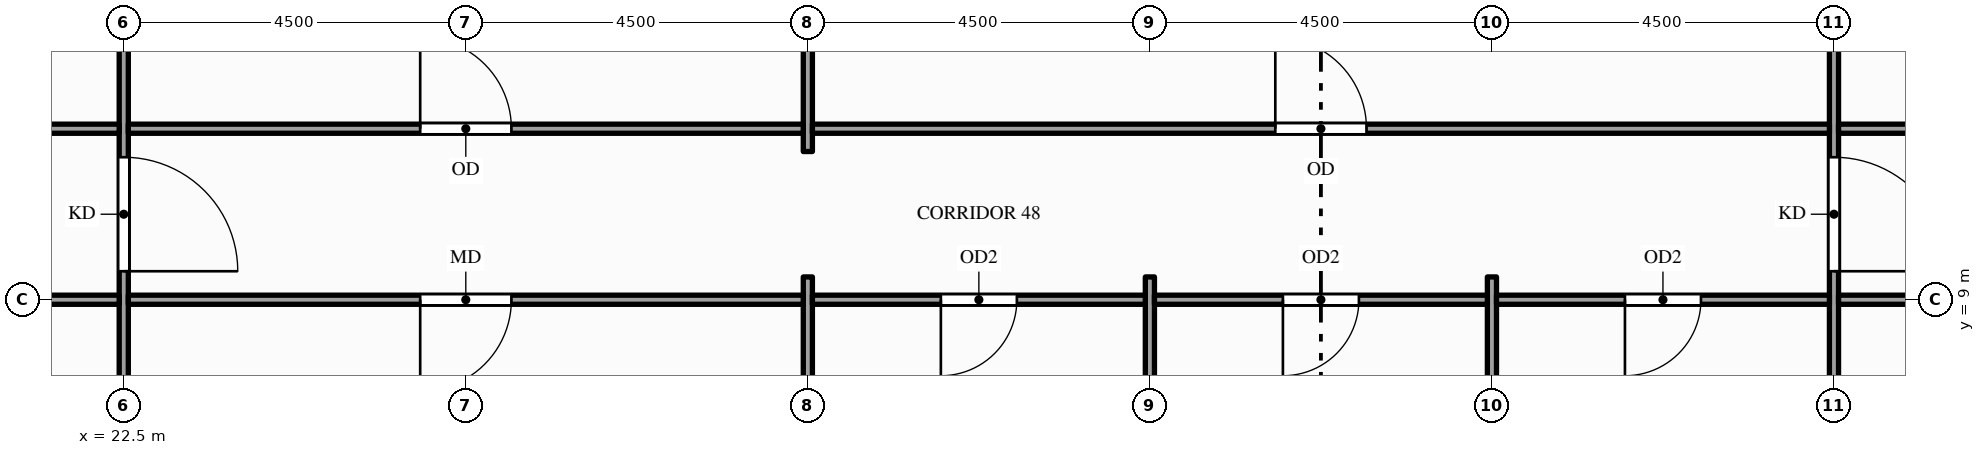
"""IFC4 building model, lengths in metres.
Left out: names, types, materials, properties, quantities, classifications, styles, units other than length and angle.
Written with IfcOpenShell. Run it as: python <this file> out.ifc"""

import sys

from ifc_helpers import new_model, si_unit, direction, frame, frame_2d, origin, place, context, subcontext, project, spatial, rectangle, extrude, element, fill, save


model = new_model("IFC4")
c1 = context("Model", 3, precision=1e-05, world=origin(), true_north=direction((0.0, 1.0)))
c2 = subcontext(c1, "Body", "Model", "MODEL_VIEW")
j1 = project(units=[si_unit("LENGTHUNIT", "METRE"), si_unit("PLANEANGLEUNIT", "RADIAN")], contexts=[c1])
p1 = place(None, origin())
s1 = spatial("IfcSite", under=j1, at=p1, CompositionType="ELEMENT")
p2 = place(p1, origin())
s2 = spatial("IfcBuilding", under=s1, at=p2, CompositionType="ELEMENT")
p3 = place(p2, frame((0.0, 0.0, 8.0)))
s3 = spatial("IfcBuildingStorey", under=s2, at=p3, CompositionType="ELEMENT", Elevation=8.0)
p4 = place(p3, frame((22.5, 0.15, 0.0), z_axis=(0.0, 0.0, 1.0), x_axis=(0.0, 1.0, 0.0)))
e1 = element("IfcWall", 1, at=p4, inside=s3, PredefinedType="PARTITIONING", context=c2, shape_type="SweptSolid", body=[
    extrude(rectangle(XDim=35.95, YDim=0.12, at=frame_2d((17.975, 0.0))), origin(), (0.0, 0.0, 1.0), 4.759),
])
p5 = place(p4, frame((9.225, 0.0, 0.0)))
e2 = element("IfcOpeningElement", 2, at=p5, cuts=e1, PredefinedType="OPENING", context=c2, shape_type="SweptSolid", body=[
    extrude(rectangle(XDim=1.5, YDim=2.1, at=frame_2d((0.75, 1.05))), frame((0.0, 0.07, 0.0), z_axis=(0.0, -1.0, 0.0), x_axis=(1.0, 0.0, 0.0)), (0.0, 0.0, 1.0), 0.14),
])
p6 = place(p4, frame((32.7, 0.0, 0.0)))
e3 = element("IfcOpeningElement", 3, at=p6, cuts=e1, PredefinedType="OPENING", context=c2, shape_type="SweptSolid", body=[
    extrude(rectangle(XDim=1.8, YDim=2.1, at=frame_2d((0.9, 1.05))), frame((0.0, 0.07, 0.0), z_axis=(0.0, -1.0, 0.0), x_axis=(1.0, 0.0, 0.0)), (0.0, 0.0, 1.0), 0.14),
])
p7 = place(p3, frame((31.5, 0.15, 0.0), z_axis=(0.0, 0.0, 1.0), x_axis=(0.0, 1.0, 0.0)))
e4 = element("IfcWall", 4, at=p7, inside=s3, PredefinedType="PARTITIONING", context=c2, shape_type="SweptSolid", body=[
    extrude(rectangle(XDim=9.15, YDim=0.12, at=frame_2d((4.575, 0.0))), origin(), (0.0, 0.0, 1.0), 4.759),
])
p8 = place(p3, frame((31.5, 10.95, 0.0), z_axis=(0.0, 0.0, 1.0), x_axis=(0.0, 1.0, 0.0)))
e5 = element("IfcWall", 5, at=p8, inside=s3, PredefinedType="PARTITIONING", context=c2, shape_type="SweptSolid", body=[
    extrude(rectangle(XDim=11.85, YDim=0.12, at=frame_2d((5.925, 0.0))), origin(), (0.0, 0.0, 1.0), 4.759),
])
for number, where, z_axis, x_axis in (
    (6, (36.0, 0.15, 0.0), (0.0, 0.0, 1.0), (0.0, 1.0, 0.0)),
    (7, (40.5, 0.15, 0.0), (0.0, 0.0, 1.0), (0.0, 1.0, 0.0)),
):
    element("IfcWall", number, at=place(p3, frame(where, z_axis=z_axis, x_axis=x_axis)), inside=s3, PredefinedType="PARTITIONING", context=c2, shape_type="SweptSolid", body=[
        extrude(rectangle(XDim=9.15, YDim=0.12, at=frame_2d((4.575, 0.0))), origin(), (0.0, 0.0, 1.0), 4.759),
    ])
p9 = place(p3, frame((45.0, 0.15, 0.0), z_axis=(0.0, 0.0, 1.0), x_axis=(0.0, 1.0, 0.0)))
e8 = element("IfcWall", 8, at=p9, inside=s3, PredefinedType="PARTITIONING", context=c2, shape_type="SweptSolid", body=[
    extrude(rectangle(XDim=22.65, YDim=0.12, at=frame_2d((11.325, 0.0))), origin(), (0.0, 0.0, 1.0), 4.759),
])
p10 = place(p9, frame((9.225, 0.0, 0.0)))
e9 = element("IfcOpeningElement", 9, at=p10, cuts=e8, PredefinedType="OPENING", context=c2, shape_type="SweptSolid", body=[
    extrude(rectangle(XDim=1.5, YDim=2.1, at=frame_2d((0.75, 1.05))), frame((0.0, 0.07, 0.0), z_axis=(0.0, -1.0, 0.0), x_axis=(1.0, 0.0, 0.0)), (0.0, 0.0, 1.0), 0.14),
])
p11 = place(p3, frame((18.06, 9.0, 0.0), z_axis=(0.0, 0.0, 1.0), x_axis=(1.0, 0.0, 0.0)))
e10 = element("IfcWall", 10, at=p11, inside=s3, PredefinedType="PARTITIONING", context=c2, shape_type="SweptSolid", body=[
    extrude(rectangle(XDim=4.38, YDim=0.12, at=frame_2d((2.19, 0.0))), origin(), (0.0, 0.0, 1.0), 4.759),
])
p12 = place(p11, frame((1.69, 0.0, 0.0)))
e11 = element("IfcOpeningElement", 11, at=p12, cuts=e10, PredefinedType="OPENING", context=c2, shape_type="SweptSolid", body=[
    extrude(rectangle(XDim=1.0, YDim=2.1, at=frame_2d((0.5, 1.05))), frame((0.0, 0.07, 0.0), z_axis=(0.0, -1.0, 0.0), x_axis=(1.0, 0.0, 0.0)), (0.0, 0.0, 1.0), 0.14),
])
p13 = place(p3, frame((22.56, 9.0, 0.0), z_axis=(0.0, 0.0, 1.0), x_axis=(1.0, 0.0, 0.0)))
e12 = element("IfcWall", 12, at=p13, inside=s3, PredefinedType="PARTITIONING", context=c2, shape_type="SweptSolid", body=[
    extrude(rectangle(XDim=8.88, YDim=0.12, at=frame_2d((4.44, 0.0))), origin(), (0.0, 0.0, 1.0), 4.66),
])
p14 = place(p13, frame((3.84, 0.0, 0.0)))
e13 = element("IfcOpeningElement", 13, at=p14, cuts=e12, PredefinedType="OPENING", context=c2, shape_type="SweptSolid", body=[
    extrude(rectangle(XDim=1.2, YDim=2.1, at=frame_2d((0.6, 1.05))), frame((0.0, 0.07, 0.0), z_axis=(0.0, -1.0, 0.0), x_axis=(1.0, 0.0, 0.0)), (0.0, 0.0, 1.0), 0.14),
])
p15 = place(p3, frame((31.56, 9.0, 0.0), z_axis=(0.0, 0.0, 1.0), x_axis=(1.0, 0.0, 0.0)))
e14 = element("IfcWall", 14, at=p15, inside=s3, PredefinedType="PARTITIONING", context=c2, shape_type="SweptSolid", body=[
    extrude(rectangle(XDim=4.38, YDim=0.12, at=frame_2d((2.19, 0.0))), origin(), (0.0, 0.0, 1.0), 4.66),
])
p16 = place(p15, frame((1.69, 0.0, 0.0)))
e15 = element("IfcOpeningElement", 15, at=p16, cuts=e14, PredefinedType="OPENING", context=c2, shape_type="SweptSolid", body=[
    extrude(rectangle(XDim=1.0, YDim=2.1, at=frame_2d((0.5, 1.05))), frame((0.0, 0.07, 0.0), z_axis=(0.0, -1.0, 0.0), x_axis=(1.0, 0.0, 0.0)), (0.0, 0.0, 1.0), 0.14),
])
p17 = place(p3, frame((36.06, 9.0, 0.0), z_axis=(0.0, 0.0, 1.0), x_axis=(1.0, 0.0, 0.0)))
e16 = element("IfcWall", 16, at=p17, inside=s3, PredefinedType="PARTITIONING", context=c2, shape_type="SweptSolid", body=[
    extrude(rectangle(XDim=4.38, YDim=0.12, at=frame_2d((2.19, 0.0))), origin(), (0.0, 0.0, 1.0), 4.66),
])
p18 = place(p17, frame((1.69, 0.0, 0.0)))
e17 = element("IfcOpeningElement", 17, at=p18, cuts=e16, PredefinedType="OPENING", context=c2, shape_type="SweptSolid", body=[
    extrude(rectangle(XDim=1.0, YDim=2.1, at=frame_2d((0.5, 1.05))), frame((0.0, 0.07, 0.0), z_axis=(0.0, -1.0, 0.0), x_axis=(1.0, 0.0, 0.0)), (0.0, 0.0, 1.0), 0.14),
])
p19 = place(p3, frame((40.56, 9.0, 0.0), z_axis=(0.0, 0.0, 1.0), x_axis=(1.0, 0.0, 0.0)))
e18 = element("IfcWall", 18, at=p19, inside=s3, PredefinedType="PARTITIONING", context=c2, shape_type="SweptSolid", body=[
    extrude(rectangle(XDim=4.38, YDim=0.12, at=frame_2d((2.19, 0.0))), origin(), (0.0, 0.0, 1.0), 4.66),
])
p20 = place(p19, frame((1.69, 0.0, 0.0)))
e19 = element("IfcOpeningElement", 19, at=p20, cuts=e18, PredefinedType="OPENING", context=c2, shape_type="SweptSolid", body=[
    extrude(rectangle(XDim=1.0, YDim=2.1, at=frame_2d((0.5, 1.05))), frame((0.0, 0.07, 0.0), z_axis=(0.0, -1.0, 0.0), x_axis=(1.0, 0.0, 0.0)), (0.0, 0.0, 1.0), 0.14),
])
p21 = place(p3, frame((45.06, 9.0, 0.0), z_axis=(0.0, 0.0, 1.0), x_axis=(1.0, 0.0, 0.0)))
e20 = element("IfcWall", 20, at=p21, inside=s3, PredefinedType="PARTITIONING", context=c2, shape_type="SweptSolid", body=[
    extrude(rectangle(XDim=4.38, YDim=0.12, at=frame_2d((2.19, 0.0))), origin(), (0.0, 0.0, 1.0), 4.66),
])
p22 = place(p3, frame((11.31, 11.25, 0.0), z_axis=(0.0, 0.0, 1.0), x_axis=(1.0, 0.0, 0.0)))
e21 = element("IfcWall", 21, at=p22, inside=s3, PredefinedType="PARTITIONING", context=c2, shape_type="SweptSolid", body=[
    extrude(rectangle(XDim=11.13, YDim=0.12, at=frame_2d((5.565, 0.0))), origin(), (0.0, 0.0, 1.0), 4.759),
])
p23 = place(p3, frame((22.56, 11.25, 0.0), z_axis=(0.0, 0.0, 1.0), x_axis=(1.0, 0.0, 0.0)))
e22 = element("IfcWall", 22, at=p23, inside=s3, PredefinedType="PARTITIONING", context=c2, shape_type="SweptSolid", body=[
    extrude(rectangle(XDim=8.88, YDim=0.12, at=frame_2d((4.44, 0.0))), origin(), (0.0, 0.0, 1.0), 4.66),
])
p24 = place(p23, frame((3.84, 0.0, 0.0)))
e23 = element("IfcOpeningElement", 23, at=p24, cuts=e22, PredefinedType="OPENING", context=c2, shape_type="SweptSolid", body=[
    extrude(rectangle(XDim=1.2, YDim=2.1, at=frame_2d((0.6, 1.05))), frame((0.0, 0.07, 0.0), z_axis=(0.0, -1.0, 0.0), x_axis=(1.0, 0.0, 0.0)), (0.0, 0.0, 1.0), 0.14),
])
p25 = place(p3, frame((31.56, 11.25, 0.0), z_axis=(0.0, 0.0, 1.0), x_axis=(1.0, 0.0, 0.0)))
e24 = element("IfcWall", 24, at=p25, inside=s3, PredefinedType="PARTITIONING", context=c2, shape_type="SweptSolid", body=[
    extrude(rectangle(XDim=13.38, YDim=0.12, at=frame_2d((6.69, 0.0))), origin(), (0.0, 0.0, 1.0), 4.66),
])
p26 = place(p25, frame((6.09, 0.0, 0.0)))
e25 = element("IfcOpeningElement", 25, at=p26, cuts=e24, PredefinedType="OPENING", context=c2, shape_type="SweptSolid", body=[
    extrude(rectangle(XDim=1.2, YDim=2.1, at=frame_2d((0.6, 1.05))), frame((0.0, 0.07, 0.0), z_axis=(0.0, -1.0, 0.0), x_axis=(1.0, 0.0, 0.0)), (0.0, 0.0, 1.0), 0.14),
])
p27 = place(p3, frame((45.06, 11.25, 0.0), z_axis=(0.0, 0.0, 1.0), x_axis=(1.0, 0.0, 0.0)))
e26 = element("IfcWall", 26, at=p27, inside=s3, PredefinedType="PARTITIONING", context=c2, shape_type="SweptSolid", body=[
    extrude(rectangle(XDim=4.38, YDim=0.12, at=frame_2d((2.19, 0.0))), origin(), (0.0, 0.0, 1.0), 4.66),
])
p28 = place(p10, origin())
e27 = element("IfcDoor", 27, at=p28, inside=s3, OperationType="SINGLE_SWING_LEFT", PredefinedType="DOOR", context=c2, shape_type="SweptSolid", body=[
    extrude(rectangle(XDim=1.5, YDim=2.1, at=frame_2d((0.75, 1.05))), frame((0.0, 0.025, 0.0), z_axis=(0.0, -1.0, 0.0), x_axis=(1.0, 0.0, 0.0)), (0.0, 0.0, 1.0), 0.05),
])
fill(e9, e27)
p29 = place(p14, origin())
e28 = element("IfcDoor", 28, at=p29, inside=s3, OperationType="SINGLE_SWING_LEFT", PredefinedType="DOOR", context=c2, shape_type="SweptSolid", body=[
    extrude(rectangle(XDim=1.2, YDim=2.1, at=frame_2d((0.6, 1.05))), frame((0.0, 0.025, 0.0), z_axis=(0.0, -1.0, 0.0), x_axis=(1.0, 0.0, 0.0)), (0.0, 0.0, 1.0), 0.05),
])
fill(e13, e28)
p30 = place(p16, origin())
e29 = element("IfcDoor", 29, at=p30, inside=s3, OperationType="SINGLE_SWING_LEFT", PredefinedType="DOOR", context=c2, shape_type="SweptSolid", body=[
    extrude(rectangle(XDim=1.0, YDim=2.1, at=frame_2d((0.5, 1.05))), frame((0.0, 0.025, 0.0), z_axis=(0.0, -1.0, 0.0), x_axis=(1.0, 0.0, 0.0)), (0.0, 0.0, 1.0), 0.05),
])
fill(e15, e29)
p31 = place(p18, origin())
e30 = element("IfcDoor", 30, at=p31, inside=s3, OperationType="SINGLE_SWING_LEFT", PredefinedType="DOOR", context=c2, shape_type="SweptSolid", body=[
    extrude(rectangle(XDim=1.0, YDim=2.1, at=frame_2d((0.5, 1.05))), frame((0.0, 0.025, 0.0), z_axis=(0.0, -1.0, 0.0), x_axis=(1.0, 0.0, 0.0)), (0.0, 0.0, 1.0), 0.05),
])
fill(e17, e30)
p32 = place(p20, origin())
e31 = element("IfcDoor", 31, at=p32, inside=s3, OperationType="SINGLE_SWING_LEFT", PredefinedType="DOOR", context=c2, shape_type="SweptSolid", body=[
    extrude(rectangle(XDim=1.0, YDim=2.1, at=frame_2d((0.5, 1.05))), frame((0.0, 0.025, 0.0), z_axis=(0.0, -1.0, 0.0), x_axis=(1.0, 0.0, 0.0)), (0.0, 0.0, 1.0), 0.05),
])
fill(e19, e31)
p33 = place(p24, origin())
e32 = element("IfcDoor", 32, at=p33, inside=s3, OperationType="SINGLE_SWING_LEFT", PredefinedType="DOOR", context=c2, shape_type="SweptSolid", body=[
    extrude(rectangle(XDim=1.2, YDim=2.1, at=frame_2d((0.6, 1.05))), frame((0.0, 0.025, 0.0), z_axis=(0.0, -1.0, 0.0), x_axis=(1.0, 0.0, 0.0)), (0.0, 0.0, 1.0), 0.05),
])
fill(e23, e32)
p34 = place(p26, origin())
e33 = element("IfcDoor", 33, at=p34, inside=s3, OperationType="SINGLE_SWING_LEFT", PredefinedType="DOOR", context=c2, shape_type="SweptSolid", body=[
    extrude(rectangle(XDim=1.2, YDim=2.1, at=frame_2d((0.6, 1.05))), frame((0.0, 0.025, 0.0), z_axis=(0.0, -1.0, 0.0), x_axis=(1.0, 0.0, 0.0)), (0.0, 0.0, 1.0), 0.05),
])
fill(e25, e33)
p35 = place(p5, origin())
e34 = element("IfcDoor", 34, at=p35, inside=s3, OperationType="SINGLE_SWING_LEFT", PredefinedType="DOOR", context=c2, shape_type="SweptSolid", body=[
    extrude(rectangle(XDim=1.5, YDim=2.1, at=frame_2d((0.75, 1.05))), frame((0.0, 0.025, 0.0), z_axis=(0.0, -1.0, 0.0), x_axis=(1.0, 0.0, 0.0)), (0.0, 0.0, 1.0), 0.05),
])
fill(e2, e34)
save(model, sys.argv[1])
